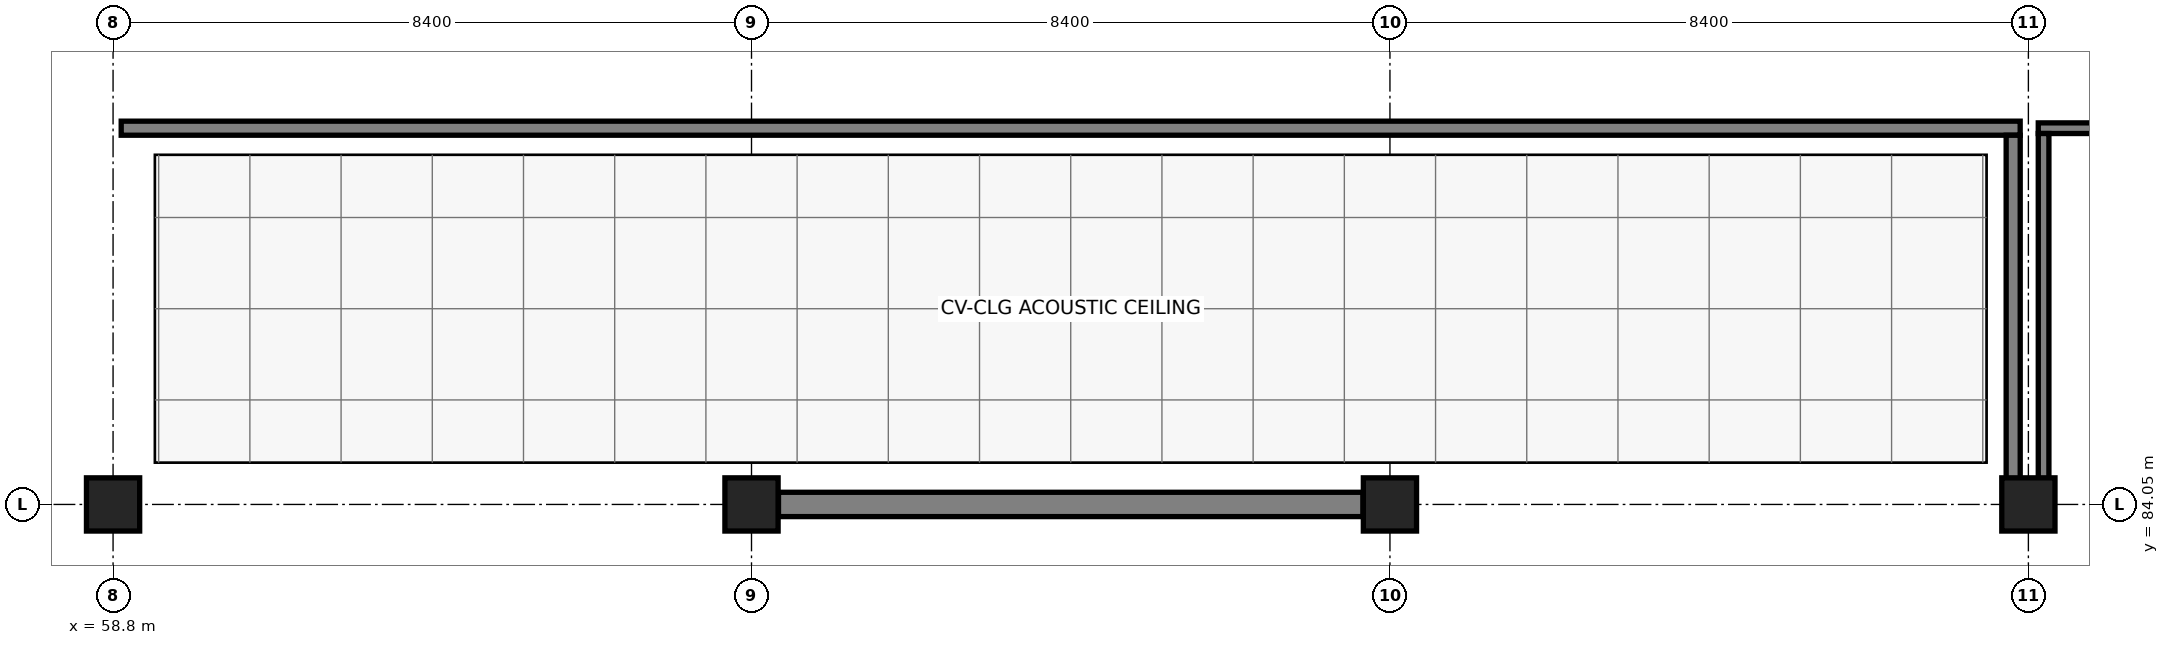
"""IFC4 building model, lengths in metres.
Left out: names, types, materials, properties, quantities, classifications, styles, units other than length and angle.
Written with IfcOpenShell. Run it as: python <this file> out.ifc"""

import sys

from ifc_helpers import new_model, si_unit, direction, frame, frame_2d, origin, origin_2d, place, context, subcontext, project, spatial, rectangle, extrude, element, fill, save


model = new_model("IFC4")
c1 = context("Model", 3, precision=1e-05, world=origin(), true_north=direction((0.0, 1.0)))
c2 = subcontext(c1, "Body", "Model", "MODEL_VIEW")
j1 = project(units=[si_unit("LENGTHUNIT", "METRE"), si_unit("PLANEANGLEUNIT", "RADIAN")], contexts=[c1])
p1 = place(None, origin())
s1 = spatial("IfcSite", under=j1, at=p1, CompositionType="ELEMENT")
p2 = place(p1, origin())
s2 = spatial("IfcBuilding", under=s1, at=p2, CompositionType="ELEMENT")
p3 = place(p2, origin())
s3 = spatial("IfcBuildingStorey", under=s2, at=p3, CompositionType="ELEMENT", Elevation=0.0)
for number, where, z_axis, x_axis in (
    (1, (58.8, 84.05, 0.0), (0.0, 0.0, 1.0), (1.0, 0.0, 0.0)),
    (2, (67.2, 84.05, 0.0), (0.0, 0.0, 1.0), (1.0, 0.0, 0.0)),
    (3, (75.6, 84.05, 0.0), (0.0, 0.0, 1.0), (1.0, 0.0, 0.0)),
    (4, (84.0, 84.05, 0.0), (0.0, 0.0, 1.0), (1.0, 0.0, 0.0)),
):
    element("IfcColumn", number, at=place(p3, frame(where, z_axis=z_axis, x_axis=x_axis)), inside=s3, PredefinedType="COLUMN", context=c2, shape_type="SweptSolid", body=[
        extrude(rectangle(XDim=0.7, YDim=0.7, at=origin_2d()), origin(), (0.0, 0.0, 1.0), 5.4),
    ])
p4 = place(p3, frame((67.555, 84.05, 0.0), z_axis=(0.0, 0.0, 1.0), x_axis=(1.0, 0.0, 0.0)))
e5 = element("IfcWall", 5, at=p4, inside=s3, PredefinedType="STANDARD", context=c2, shape_type="SweptSolid", body=[
    extrude(rectangle(XDim=7.69, YDim=0.32, at=frame_2d((3.845, 0.0))), origin(), (0.0, 0.0, 1.0), 4.23),
])
p5 = place(p4, frame((2.805, 0.0, 0.95)))
e6 = element("IfcOpeningElement", 6, at=p5, cuts=e5, PredefinedType="OPENING", context=c2, shape_type="SweptSolid", body=[
    extrude(rectangle(XDim=2.08, YDim=2.28, at=frame_2d((1.04, 1.14))), frame((0.0, 0.17, 0.0), z_axis=(0.0, -1.0, 0.0), x_axis=(1.0, 0.0, 0.0)), (0.0, 0.0, 1.0), 0.34),
])
p6 = place(p3, frame((58.907, 89.0, 0.0), z_axis=(0.0, 0.0, 1.0), x_axis=(1.0, 0.0, 0.0)))
e7 = element("IfcWall", 7, at=p6, inside=s3, PredefinedType="PARTITIONING", context=c2, shape_type="SweptSolid", body=[
    extrude(rectangle(XDim=24.985, YDim=0.185, at=frame_2d((12.493, 0.0))), origin(), (0.0, 0.0, 1.0), 2.617),
])
p7 = place(p6, frame((11.852, 0.0, 0.0)))
e8 = element("IfcOpeningElement", 8, at=p7, cuts=e7, PredefinedType="OPENING", context=c2, shape_type="SweptSolid", body=[
    extrude(rectangle(XDim=1.28, YDim=2.35, at=frame_2d((0.64, 1.175))), frame((0.0, 0.103, 0.0), z_axis=(0.0, -1.0, 0.0), x_axis=(1.0, 0.0, 0.0)), (0.0, 0.0, 1.0), 0.205),
])
p8 = place(p3, frame((83.8, 84.343, 0.0), z_axis=(0.0, 0.0, 1.0), x_axis=(0.0, 1.0, 0.0)))
e9 = element("IfcWall", 9, at=p8, inside=s3, PredefinedType="PARTITIONING", context=c2, shape_type="SweptSolid", body=[
    extrude(rectangle(XDim=4.564, YDim=0.185, at=frame_2d((2.282, 0.0))), origin(), (0.0, 0.0, 1.0), 4.14),
])
p9 = place(p3, frame((84.13, 89.0, 0.0), z_axis=(0.0, 0.0, 1.0), x_axis=(1.0, 0.0, 0.0)))
e10 = element("IfcWall", 10, at=p9, inside=s3, PredefinedType="PARTITIONING", context=c2, shape_type="SweptSolid", body=[
    extrude(rectangle(XDim=24.74, YDim=0.14, at=frame_2d((12.37, 0.0))), origin(), (0.0, 0.0, 1.0), 4.14),
])
p10 = place(p9, frame((11.65, 0.0, 0.0)))
e11 = element("IfcOpeningElement", 11, at=p10, cuts=e10, PredefinedType="OPENING", context=c2, shape_type="SweptSolid", body=[
    extrude(rectangle(XDim=1.44, YDim=2.35, at=frame_2d((0.72, 1.175))), frame((0.0, 0.08, 0.0), z_axis=(0.0, -1.0, 0.0), x_axis=(1.0, 0.0, 0.0)), (0.0, 0.0, 1.0), 0.16),
])
p11 = place(p9, frame((13.69, 0.0, 1.05)))
e12 = element("IfcOpeningElement", 12, at=p11, cuts=e10, PredefinedType="OPENING", context=c2, shape_type="SweptSolid", body=[
    extrude(rectangle(XDim=1.65, YDim=1.5, at=frame_2d((0.825, 0.75))), frame((0.0, 0.08, 0.0), z_axis=(0.0, -1.0, 0.0), x_axis=(1.0, 0.0, 0.0)), (0.0, 0.0, 1.0), 0.16),
])
p12 = place(p3, frame((84.2, 84.32, 0.0), z_axis=(0.0, 0.0, 1.0), x_axis=(0.0, 1.0, 0.0)))
e13 = element("IfcWall", 13, at=p12, inside=s3, PredefinedType="PARTITIONING", context=c2, shape_type="SweptSolid", body=[
    extrude(rectangle(XDim=4.61, YDim=0.14, at=frame_2d((2.305, 0.0))), origin(), (0.0, 0.0, 1.0), 4.14),
])
p13 = place(p5, origin())
e14 = element("IfcWindow", 14, at=p13, inside=s3, PartitioningType="SINGLE_PANEL", PredefinedType="WINDOW", context=c2, shape_type="SweptSolid", body=[
    extrude(rectangle(XDim=2.08, YDim=2.28, at=frame_2d((1.04, 1.14))), frame((0.0, 0.03, 0.0), z_axis=(0.0, -1.0, 0.0), x_axis=(1.0, 0.0, 0.0)), (0.0, 0.0, 1.0), 0.06),
])
fill(e6, e14)
p14 = place(p7, frame((1.28, 0.0, 0.0), z_axis=(0.0, 0.0, 1.0), x_axis=(-1.0, 0.0, 0.0)))
e15 = element("IfcDoor", 15, at=p14, inside=s3, OperationType="SINGLE_SWING_RIGHT", PredefinedType="DOOR", context=c2, shape_type="SweptSolid", body=[
    extrude(rectangle(XDim=1.28, YDim=2.35, at=frame_2d((0.64, 1.175))), frame((0.0, 0.025, 0.0), z_axis=(0.0, -1.0, 0.0), x_axis=(1.0, 0.0, 0.0)), (0.0, 0.0, 1.0), 0.05),
])
fill(e8, e15)
save(model, sys.argv[1])
